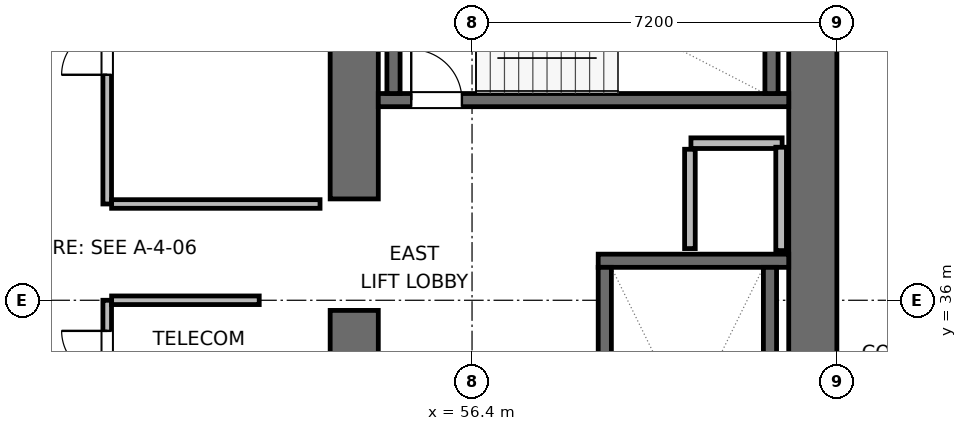
"""IFC4 building model, lengths in metres.
Left out: names, types, materials, properties, quantities, classifications, styles, units other than length and angle.
Written with IfcOpenShell. Run it as: python <this file> out.ifc"""

import sys

from ifc_helpers import new_model, si_unit, direction, frame, frame_2d, origin, place, context, subcontext, project, spatial, rectangle, extrude, element, fill, save


model = new_model("IFC4")
c1 = context("Model", 3, precision=1e-05, world=origin(), true_north=direction((0.0, 1.0)))
c2 = subcontext(c1, "Body", "Model", "MODEL_VIEW")
j1 = project(units=[si_unit("LENGTHUNIT", "METRE"), si_unit("PLANEANGLEUNIT", "RADIAN")], contexts=[c1])
p1 = place(None, origin())
s1 = spatial("IfcSite", under=j1, at=p1, CompositionType="ELEMENT")
p2 = place(p1, origin())
s2 = spatial("IfcBuilding", under=s1, at=p2, CompositionType="ELEMENT")
p3 = place(p2, frame((0.0, 0.0, 89.7)))
s3 = spatial("IfcBuildingStorey", under=s2, at=p3, CompositionType="ELEMENT", Elevation=89.7)
p4 = place(p3, frame((54.075, 28.075, 0.0), z_axis=(0.0, 0.0, 1.0), x_axis=(0.0, 1.0, 0.0)))
e1 = element("IfcWall", 1, at=p4, inside=s3, PredefinedType="SHEAR", context=c2, shape_type="SweptSolid", body=[
    extrude(rectangle(XDim=7.725, YDim=0.95, at=frame_2d((3.863, 0.0))), origin(), (0.0, 0.0, 1.0), 3.9),
])
p5 = place(p3, frame((54.075, 38.0, 0.0), z_axis=(0.0, 0.0, 1.0), x_axis=(0.0, 1.0, 0.0)))
e2 = element("IfcWall", 2, at=p5, inside=s3, PredefinedType="SHEAR", context=c2, shape_type="SweptSolid", body=[
    extrude(rectangle(XDim=5.925, YDim=0.95, at=frame_2d((2.962, 0.0))), origin(), (0.0, 0.0, 1.0), 3.9),
])
p6 = place(p3, frame((63.125, 27.6, 0.0), z_axis=(0.0, 0.0, 1.0), x_axis=(0.0, 1.0, 0.0)))
e3 = element("IfcWall", 3, at=p6, inside=s3, PredefinedType="SHEAR", context=c2, shape_type="SweptSolid", body=[
    extrude(rectangle(XDim=16.8, YDim=0.95, at=frame_2d((8.4, 0.0))), origin(), (0.0, 0.0, 1.0), 3.9),
])
p7 = place(p3, frame((58.89, 36.78, 0.0), z_axis=(0.0, 0.0, 1.0), x_axis=(1.0, 0.0, 0.0)))
e4 = element("IfcWall", 4, at=p7, inside=s3, PredefinedType="SHEAR", context=c2, shape_type="SweptSolid", body=[
    extrude(rectangle(XDim=3.76, YDim=0.26, at=frame_2d((1.88, 0.0))), origin(), (0.0, 0.0, 1.0), 3.9),
])
p8 = place(p3, frame((59.02, 29.05, 0.0), z_axis=(0.0, 0.0, 1.0), x_axis=(0.0, 1.0, 0.0)))
e5 = element("IfcWall", 5, at=p8, inside=s3, PredefinedType="SHEAR", context=c2, shape_type="SweptSolid", body=[
    extrude(rectangle(XDim=7.6, YDim=0.26, at=frame_2d((3.8, 0.0))), origin(), (0.0, 0.0, 1.0), 3.9),
])
p9 = place(p8, frame((0.3, 0.0, 0.0)))
e6 = element("IfcOpeningElement", 6, at=p9, cuts=e5, PredefinedType="OPENING", context=c2, shape_type="SweptSolid", body=[
    extrude(rectangle(XDim=1.0, YDim=2.04, at=frame_2d((0.5, 1.02))), frame((0.0, 0.14, 0.0), z_axis=(0.0, -1.0, 0.0), x_axis=(1.0, 0.0, 0.0)), (0.0, 0.0, 1.0), 0.28),
])
p10 = place(p3, frame((62.28, 29.05, 0.0), z_axis=(0.0, 0.0, 1.0), x_axis=(0.0, 1.0, 0.0)))
e7 = element("IfcWall", 7, at=p10, inside=s3, PredefinedType="SHEAR", context=c2, shape_type="SweptSolid", body=[
    extrude(rectangle(XDim=7.6, YDim=0.26, at=frame_2d((3.8, 0.0))), origin(), (0.0, 0.0, 1.0), 3.9),
])
p11 = place(p3, frame((54.55, 39.95, 0.0), z_axis=(0.0, 0.0, 1.0), x_axis=(1.0, 0.0, 0.0)))
e8 = element("IfcWall", 8, at=p11, inside=s3, PredefinedType="SHEAR", context=c2, shape_type="SweptSolid", body=[
    extrude(rectangle(XDim=8.1, YDim=0.26, at=frame_2d((4.05, 0.0))), origin(), (0.0, 0.0, 1.0), 3.9),
])
p12 = place(p11, frame((0.65, 0.0, 0.0)))
e9 = element("IfcOpeningElement", 9, at=p12, cuts=e8, PredefinedType="OPENING", context=c2, shape_type="SweptSolid", body=[
    extrude(rectangle(XDim=1.0, YDim=2.04, at=frame_2d((0.5, 1.02))), frame((0.0, 0.14, 0.0), z_axis=(0.0, -1.0, 0.0), x_axis=(1.0, 0.0, 0.0)), (0.0, 0.0, 1.0), 0.28),
])
for number, where, z_axis, x_axis in (
    (10, (54.85, 40.08, 0.0), (0.0, 0.0, 1.0), (0.0, 1.0, 0.0)),
    (11, (62.31, 40.08, 0.0), (0.0, 0.0, 1.0), (0.0, 1.0, 0.0)),
):
    element("IfcWall", number, at=place(p3, frame(where, z_axis=z_axis, x_axis=x_axis)), inside=s3, PredefinedType="SHEAR", context=c2, shape_type="SweptSolid", body=[
        extrude(rectangle(XDim=2.94, YDim=0.26, at=frame_2d((1.47, 0.0))), origin(), (0.0, 0.0, 1.0), 3.9),
    ])
p13 = place(p3, frame((60.72, 39.1, 0.0), z_axis=(0.0, 0.0, 1.0), x_axis=(1.0, 0.0, 0.0)))
e12 = element("IfcWall", 12, at=p13, inside=s3, PredefinedType="PARTITIONING", context=c2, shape_type="SweptSolid", body=[
    extrude(rectangle(XDim=1.8, YDim=0.21, at=frame_2d((0.9, 0.0))), origin(), (0.0, 0.0, 1.0), 3.64),
])
p14 = place(p3, frame((60.7, 37.02, 0.0), z_axis=(0.0, 0.0, 1.0), x_axis=(0.0, 1.0, 0.0)))
e13 = element("IfcWall", 13, at=p14, inside=s3, PredefinedType="PARTITIONING", context=c2, shape_type="SweptSolid", body=[
    extrude(rectangle(XDim=1.96, YDim=0.21, at=frame_2d((0.98, 0.0))), origin(), (0.0, 0.0, 1.0), 3.64),
])
p15 = place(p3, frame((62.5, 36.98, 0.0), z_axis=(0.0, 0.0, 1.0), x_axis=(0.0, 1.0, 0.0)))
e14 = element("IfcWall", 14, at=p15, inside=s3, PredefinedType="PARTITIONING", context=c2, shape_type="SweptSolid", body=[
    extrude(rectangle(XDim=2.04, YDim=0.21, at=frame_2d((1.02, 0.0))), origin(), (0.0, 0.0, 1.0), 3.64),
])
p16 = place(p3, frame((49.2, 32.6, 0.0), z_axis=(0.0, 0.0, 1.0), x_axis=(0.0, 1.0, 0.0)))
e15 = element("IfcWall", 15, at=p16, inside=s3, PredefinedType="PARTITIONING", context=c2, shape_type="SweptSolid", body=[
    extrude(rectangle(XDim=3.4, YDim=0.17, at=frame_2d((1.7, 0.0))), origin(), (0.0, 0.0, 1.0), 3.64),
])
p17 = place(p16, frame((0.196, 0.0, 0.0)))
e16 = element("IfcOpeningElement", 16, at=p17, cuts=e15, PredefinedType="OPENING", context=c2, shape_type="SweptSolid", body=[
    extrude(rectangle(XDim=0.9, YDim=2.02, at=frame_2d((0.45, 1.01))), frame((0.0, 0.095, 0.0), z_axis=(0.0, -1.0, 0.0), x_axis=(1.0, 0.0, 0.0)), (0.0, 0.0, 1.0), 0.19),
])
p18 = place(p16, frame((1.896, 0.0, 0.0)))
e17 = element("IfcOpeningElement", 17, at=p18, cuts=e15, PredefinedType="OPENING", context=c2, shape_type="SweptSolid", body=[
    extrude(rectangle(XDim=0.9, YDim=2.02, at=frame_2d((0.45, 1.01))), frame((0.0, 0.095, 0.0), z_axis=(0.0, -1.0, 0.0), x_axis=(1.0, 0.0, 0.0)), (0.0, 0.0, 1.0), 0.19),
])
p19 = place(p3, frame((49.287, 36.0, 0.0), z_axis=(0.0, 0.0, 1.0), x_axis=(1.0, 0.0, 0.0)))
e18 = element("IfcWall", 18, at=p19, inside=s3, PredefinedType="PARTITIONING", context=c2, shape_type="SweptSolid", body=[
    extrude(rectangle(XDim=2.913, YDim=0.17, at=frame_2d((1.457, 0.0))), origin(), (0.0, 0.0, 1.0), 3.64),
])
p20 = place(p3, frame((49.2, 37.9, 0.0), z_axis=(0.0, 0.0, 1.0), x_axis=(0.0, 1.0, 0.0)))
e19 = element("IfcWall", 19, at=p20, inside=s3, PredefinedType="PARTITIONING", context=c2, shape_type="SweptSolid", body=[
    extrude(rectangle(XDim=6.0, YDim=0.17, at=frame_2d((3.0, 0.0))), origin(), (0.0, 0.0, 1.0), 3.64),
])
p21 = place(p20, frame((2.55, 0.0, 0.0)))
e20 = element("IfcOpeningElement", 20, at=p21, cuts=e19, PredefinedType="OPENING", context=c2, shape_type="SweptSolid", body=[
    extrude(rectangle(XDim=0.9, YDim=2.02, at=frame_2d((0.45, 1.01))), frame((0.0, 0.095, 0.0), z_axis=(0.0, -1.0, 0.0), x_axis=(1.0, 0.0, 0.0)), (0.0, 0.0, 1.0), 0.19),
])
p22 = place(p3, frame((49.287, 37.9, 0.0), z_axis=(0.0, 0.0, 1.0), x_axis=(1.0, 0.0, 0.0)))
e21 = element("IfcWall", 21, at=p22, inside=s3, PredefinedType="PARTITIONING", context=c2, shape_type="SweptSolid", body=[
    extrude(rectangle(XDim=4.113, YDim=0.17, at=frame_2d((2.056, 0.0))), origin(), (0.0, 0.0, 1.0), 3.64),
])
p23 = place(p12, origin())
e22 = element("IfcDoor", 22, at=p23, inside=s3, OperationType="SINGLE_SWING_LEFT", PredefinedType="DOOR", context=c2, shape_type="SweptSolid", body=[
    extrude(rectangle(XDim=1.0, YDim=2.04, at=frame_2d((0.5, 1.02))), frame((0.0, 0.025, 0.0), z_axis=(0.0, -1.0, 0.0), x_axis=(1.0, 0.0, 0.0)), (0.0, 0.0, 1.0), 0.05),
])
fill(e9, e22)
p24 = place(p18, origin())
e23 = element("IfcDoor", 23, at=p24, inside=s3, OperationType="SINGLE_SWING_RIGHT", PredefinedType="DOOR", context=c2, shape_type="SweptSolid", body=[
    extrude(rectangle(XDim=0.9, YDim=2.02, at=frame_2d((0.45, 1.01))), frame((0.0, 0.025, 0.0), z_axis=(0.0, -1.0, 0.0), x_axis=(1.0, 0.0, 0.0)), (0.0, 0.0, 1.0), 0.05),
])
fill(e17, e23)
p25 = place(p21, origin())
e24 = element("IfcDoor", 24, at=p25, inside=s3, OperationType="SINGLE_SWING_LEFT", PredefinedType="DOOR", context=c2, shape_type="SweptSolid", body=[
    extrude(rectangle(XDim=0.9, YDim=2.02, at=frame_2d((0.45, 1.01))), frame((0.0, 0.025, 0.0), z_axis=(0.0, -1.0, 0.0), x_axis=(1.0, 0.0, 0.0)), (0.0, 0.0, 1.0), 0.05),
])
fill(e20, e24)
save(model, sys.argv[1])
